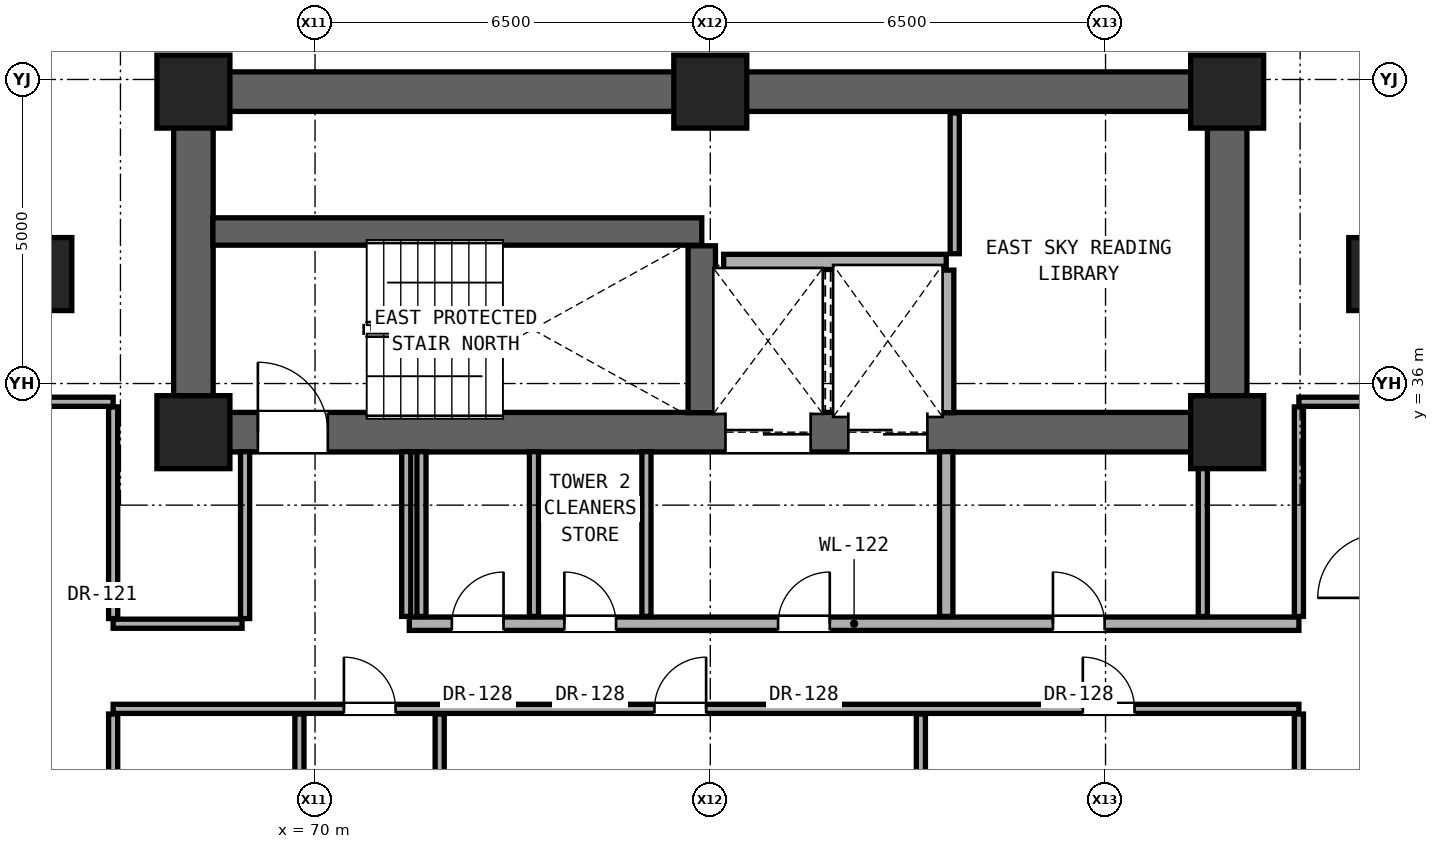
"""IFC4 building model, lengths in metres.
Left out: names, types, materials, properties, quantities, classifications, styles, units other than length and angle.
Written with IfcOpenShell. Run it as: python <this file> out.ifc"""

import sys

from ifc_helpers import new_model, si_unit, direction, frame, frame_2d, origin, origin_2d, place, context, subcontext, project, spatial, rectangle, extrude, element, fill, save


model = new_model("IFC4")
c1 = context("Model", 3, precision=1e-05, world=origin(), true_north=direction((0.0, 1.0)))
c2 = subcontext(c1, "Body", "Model", "MODEL_VIEW")
j1 = project(units=[si_unit("LENGTHUNIT", "METRE"), si_unit("PLANEANGLEUNIT", "RADIAN")], contexts=[c1])
p1 = place(None, origin())
s1 = spatial("IfcSite", under=j1, at=p1, CompositionType="ELEMENT")
p2 = place(p1, origin())
s2 = spatial("IfcBuilding", under=s1, at=p2, CompositionType="ELEMENT")
p3 = place(p2, frame((0.0, 0.0, 104.9)))
s3 = spatial("IfcBuildingStorey", under=s2, at=p3, CompositionType="ELEMENT", Elevation=104.9)
for number, where, z_axis, x_axis in (
    (1, (68.0, 35.2, 0.0), (0.0, 0.0, 1.0), (1.0, 0.0, 0.0)),
    (2, (85.0, 35.2, 0.0), (0.0, 0.0, 1.0), (1.0, 0.0, 0.0)),
    (3, (68.0, 40.8, 0.0), (0.0, 0.0, 1.0), (1.0, 0.0, 0.0)),
    (4, (76.5, 40.8, 0.0), (0.0, 0.0, 1.0), (1.0, 0.0, 0.0)),
    (5, (85.0, 40.8, 0.0), (0.0, 0.0, 1.0), (1.0, 0.0, 0.0)),
):
    element("IfcColumn", number, at=place(p3, frame(where, z_axis=z_axis, x_axis=x_axis)), inside=s3, PredefinedType="COLUMN", context=c2, shape_type="SweptSolid", body=[
        extrude(rectangle(XDim=1.2, YDim=1.2, at=origin_2d()), origin(), (0.0, 0.0, 1.0), 3.3),
    ])
for number, where, z_axis, x_axis in (
    (6, (65.6, 37.8, 0.0), (0.0, 0.0, 1.0), (1.0, 0.0, 0.0)),
    (7, (87.4, 37.8, 0.0), (0.0, 0.0, 1.0), (1.0, 0.0, 0.0)),
):
    element("IfcColumn", number, at=place(p3, frame(where, z_axis=z_axis, x_axis=x_axis)), inside=s3, PredefinedType="PILASTER", context=c2, shape_type="SweptSolid", body=[
        extrude(rectangle(XDim=0.8, YDim=1.2, at=origin_2d()), origin(), (0.0, 0.0, 1.0), 3.3),
    ])
p4 = place(p3, frame((68.0, 40.8, 0.0), z_axis=(0.0, 0.0, 1.0), x_axis=(1.0, 0.0, 0.0)))
e8 = element("IfcWall", 8, at=p4, inside=s3, PredefinedType="SHEAR", context=c2, shape_type="SweptSolid", body=[
    extrude(rectangle(XDim=17.0, YDim=0.65, at=frame_2d((8.5, 0.0))), origin(), (0.0, 0.0, 1.0), 3.08),
])
for number, where, z_axis, x_axis in (
    (9, (68.0, 35.2, 0.0), (0.0, 0.0, 1.0), (0.0, 1.0, 0.0)),
    (10, (85.0, 35.2, 0.0), (0.0, 0.0, 1.0), (0.0, 1.0, 0.0)),
):
    element("IfcWall", number, at=place(p3, frame(where, z_axis=z_axis, x_axis=x_axis)), inside=s3, PredefinedType="SHEAR", context=c2, shape_type="SweptSolid", body=[
        extrude(rectangle(XDim=5.6, YDim=0.65, at=frame_2d((2.8, 0.0))), origin(), (0.0, 0.0, 1.0), 3.08),
    ])
p5 = place(p3, frame((68.0, 35.2, 0.0), z_axis=(0.0, 0.0, 1.0), x_axis=(1.0, 0.0, 0.0)))
e11 = element("IfcWall", 11, at=p5, inside=s3, PredefinedType="SHEAR", context=c2, shape_type="SweptSolid", body=[
    extrude(rectangle(XDim=17.0, YDim=0.65, at=frame_2d((8.5, 0.0))), origin(), (0.0, 0.0, 1.0), 3.08),
])
p6 = place(p5, frame((1.06, 0.0, 0.0)))
e12 = element("IfcOpeningElement", 12, at=p6, cuts=e11, PredefinedType="OPENING", context=c2, shape_type="SweptSolid", body=[
    extrude(rectangle(XDim=1.15, YDim=2.2, at=frame_2d((0.575, 1.1))), frame((0.0, 0.335, 0.0), z_axis=(0.0, -1.0, 0.0), x_axis=(1.0, 0.0, 0.0)), (0.0, 0.0, 1.0), 0.67),
])
p7 = place(p5, frame((8.75, 0.0, 0.0)))
e13 = element("IfcOpeningElement", 13, at=p7, cuts=e11, PredefinedType="OPENING", context=c2, shape_type="SweptSolid", body=[
    extrude(rectangle(XDim=1.4, YDim=2.35, at=frame_2d((0.7, 1.175))), frame((0.0, 0.335, 0.0), z_axis=(0.0, -1.0, 0.0), x_axis=(1.0, 0.0, 0.0)), (0.0, 0.0, 1.0), 0.67),
])
p8 = place(p5, frame((10.77, 0.0, 0.0)))
e14 = element("IfcOpeningElement", 14, at=p8, cuts=e11, PredefinedType="OPENING", context=c2, shape_type="SweptSolid", body=[
    extrude(rectangle(XDim=1.3, YDim=2.3, at=frame_2d((0.65, 1.15))), frame((0.0, 0.335, 0.0), z_axis=(0.0, -1.0, 0.0), x_axis=(1.0, 0.0, 0.0)), (0.0, 0.0, 1.0), 0.67),
])
p9 = place(p3, frame((66.68, 30.65, 0.0), z_axis=(0.0, 0.0, 1.0), x_axis=(1.0, 0.0, 0.0)))
e15 = element("IfcWall", 15, at=p9, inside=s3, PredefinedType="PARTITIONING", context=c2, shape_type="SweptSolid", body=[
    extrude(rectangle(XDim=19.5, YDim=0.15, at=frame_2d((9.75, 0.0))), origin(), (0.0, 0.0, 1.0), 2.145),
])
p10 = place(p9, frame((3.795, 0.0, 0.0)))
e16 = element("IfcOpeningElement", 16, at=p10, cuts=e15, PredefinedType="OPENING", context=c2, shape_type="SweptSolid", body=[
    extrude(rectangle(XDim=0.85, YDim=2.01, at=frame_2d((0.425, 1.005))), frame((0.0, 0.085, 0.0), z_axis=(0.0, -1.0, 0.0), x_axis=(1.0, 0.0, 0.0)), (0.0, 0.0, 1.0), 0.17),
])
p11 = place(p9, frame((8.902, 0.0, 0.0)))
e17 = element("IfcOpeningElement", 17, at=p11, cuts=e15, PredefinedType="OPENING", context=c2, shape_type="SweptSolid", body=[
    extrude(rectangle(XDim=0.85, YDim=2.01, at=frame_2d((0.425, 1.005))), frame((0.0, 0.085, 0.0), z_axis=(0.0, -1.0, 0.0), x_axis=(1.0, 0.0, 0.0)), (0.0, 0.0, 1.0), 0.17),
])
p12 = place(p9, frame((15.947, 0.0, 0.0)))
e18 = element("IfcOpeningElement", 18, at=p12, cuts=e15, PredefinedType="OPENING", context=c2, shape_type="SweptSolid", body=[
    extrude(rectangle(XDim=0.85, YDim=2.01, at=frame_2d((0.425, 1.005))), frame((0.0, 0.085, 0.0), z_axis=(0.0, -1.0, 0.0), x_axis=(1.0, 0.0, 0.0)), (0.0, 0.0, 1.0), 0.17),
])
p13 = place(p3, frame((66.68, 32.05, 0.0), z_axis=(0.0, 0.0, 1.0), x_axis=(1.0, 0.0, 0.0)))
e19 = element("IfcWall", 19, at=p13, inside=s3, PredefinedType="PARTITIONING", context=c2, shape_type="SweptSolid", body=[
    extrude(rectangle(XDim=2.12, YDim=0.15, at=frame_2d((1.06, 0.0))), origin(), (0.0, 0.0, 1.0), 2.145),
])
p14 = place(p3, frame((71.55, 32.05, 0.0), z_axis=(0.0, 0.0, 1.0), x_axis=(1.0, 0.0, 0.0)))
e20 = element("IfcWall", 20, at=p14, inside=s3, PredefinedType="SOLIDWALL", context=c2, shape_type="SweptSolid", body=[
    extrude(rectangle(XDim=14.63, YDim=0.22, at=frame_2d((7.315, 0.0))), origin(), (0.0, 0.0, 1.0), 2.145),
])
p15 = place(p14, frame((6.065, 0.0, 0.0)))
e21 = element("IfcOpeningElement", 21, at=p15, cuts=e20, PredefinedType="OPENING", context=c2, shape_type="SweptSolid", body=[
    extrude(rectangle(XDim=0.85, YDim=2.01, at=frame_2d((0.425, 1.005))), frame((0.0, 0.12, 0.0), z_axis=(0.0, -1.0, 0.0), x_axis=(1.0, 0.0, 0.0)), (0.0, 0.0, 1.0), 0.24),
])
p16 = place(p14, frame((10.585, 0.0, 0.0)))
e22 = element("IfcOpeningElement", 22, at=p16, cuts=e20, PredefinedType="OPENING", context=c2, shape_type="SweptSolid", body=[
    extrude(rectangle(XDim=0.85, YDim=2.01, at=frame_2d((0.425, 1.005))), frame((0.0, 0.12, 0.0), z_axis=(0.0, -1.0, 0.0), x_axis=(1.0, 0.0, 0.0)), (0.0, 0.0, 1.0), 0.24),
])
p17 = place(p14, frame((0.7, 0.0, 0.0)))
e23 = element("IfcOpeningElement", 23, at=p17, cuts=e20, PredefinedType="OPENING", context=c2, shape_type="SweptSolid", body=[
    extrude(rectangle(XDim=0.85, YDim=2.01, at=frame_2d((0.425, 1.005))), frame((0.0, 0.12, 0.0), z_axis=(0.0, -1.0, 0.0), x_axis=(1.0, 0.0, 0.0)), (0.0, 0.0, 1.0), 0.24),
])
p18 = place(p14, frame((2.55, 0.0, 0.0)))
e24 = element("IfcOpeningElement", 24, at=p18, cuts=e20, PredefinedType="OPENING", context=c2, shape_type="SweptSolid", body=[
    extrude(rectangle(XDim=0.85, YDim=2.01, at=frame_2d((0.425, 1.005))), frame((0.0, 0.12, 0.0), z_axis=(0.0, -1.0, 0.0), x_axis=(1.0, 0.0, 0.0)), (0.0, 0.0, 1.0), 0.24),
])
p19 = place(p3, frame((65.32, 35.7, 0.0), z_axis=(0.0, 0.0, 1.0), x_axis=(1.0, 0.0, 0.0)))
e25 = element("IfcWall", 25, at=p19, inside=s3, PredefinedType="PARTITIONING", context=c2, shape_type="SweptSolid", body=[
    extrude(rectangle(XDim=1.36, YDim=0.15, at=frame_2d((0.68, 0.0))), origin(), (0.0, 0.0, 1.0), 3.08),
])
p20 = place(p3, frame((86.18, 35.7, 0.0), z_axis=(0.0, 0.0, 1.0), x_axis=(1.0, 0.0, 0.0)))
e26 = element("IfcWall", 26, at=p20, inside=s3, PredefinedType="PARTITIONING", context=c2, shape_type="SweptSolid", body=[
    extrude(rectangle(XDim=1.36, YDim=0.15, at=frame_2d((0.68, 0.0))), origin(), (0.0, 0.0, 1.0), 3.08),
])
p21 = place(p3, frame((76.72, 38.0, 0.0), z_axis=(0.0, 0.0, 1.0), x_axis=(1.0, 0.0, 0.0)))
e27 = element("IfcWall", 27, at=p21, inside=s3, PredefinedType="SOLIDWALL", context=c2, shape_type="SweptSolid", body=[
    extrude(rectangle(XDim=3.66, YDim=0.25, at=frame_2d((1.83, 0.0))), origin(), (0.0, 0.0, 1.0), 3.08),
])
p22 = place(p3, frame((68.32, 38.5, 0.0), z_axis=(0.0, 0.0, 1.0), x_axis=(1.0, 0.0, 0.0)))
e28 = element("IfcWall", 28, at=p22, inside=s3, PredefinedType="SHEAR", context=c2, shape_type="SweptSolid", body=[
    extrude(rectangle(XDim=8.04, YDim=0.45, at=frame_2d((4.02, 0.0))), origin(), (0.0, 0.0, 1.0), 3.08),
])
p23 = place(p3, frame((66.68, 24.935, 0.0), z_axis=(0.0, 0.0, 1.0), x_axis=(0.0, 1.0, 0.0)))
e29 = element("IfcWall", 29, at=p23, inside=s3, PredefinedType="PARTITIONING", context=c2, shape_type="SweptSolid", body=[
    extrude(rectangle(XDim=5.63, YDim=0.15, at=frame_2d((2.815, 0.0))), origin(), (0.0, 0.0, 1.0), 2.299),
])
p24 = place(p23, frame((2.34, 0.0, 0.0)))
e30 = element("IfcOpeningElement", 30, at=p24, cuts=e29, PredefinedType="OPENING", context=c2, shape_type="SweptSolid", body=[
    extrude(rectangle(XDim=0.95, YDim=2.15, at=frame_2d((0.475, 1.075))), frame((0.0, 0.085, 0.0), z_axis=(0.0, -1.0, 0.0), x_axis=(1.0, 0.0, 0.0)), (0.0, 0.0, 1.0), 0.17),
])
p25 = place(p3, frame((66.68, 32.135, 0.0), z_axis=(0.0, 0.0, 1.0), x_axis=(0.0, 1.0, 0.0)))
e31 = element("IfcWall", 31, at=p25, inside=s3, PredefinedType="PARTITIONING", context=c2, shape_type="SweptSolid", body=[
    extrude(rectangle(XDim=3.48, YDim=0.15, at=frame_2d((1.74, 0.0))), origin(), (0.0, 0.0, 1.0), 2.472),
])
p26 = place(p3, frame((68.85, 32.135, 0.0), z_axis=(0.0, 0.0, 1.0), x_axis=(0.0, 1.0, 0.0)))
e32 = element("IfcWall", 32, at=p26, inside=s3, PredefinedType="PARTITIONING", context=c2, shape_type="SweptSolid", body=[
    extrude(rectangle(XDim=2.745, YDim=0.15, at=frame_2d((1.373, 0.0))), origin(), (0.0, 0.0, 1.0), 3.08),
])
p27 = place(p3, frame((69.743, 24.935, 0.0), z_axis=(0.0, 0.0, 1.0), x_axis=(0.0, 1.0, 0.0)))
e33 = element("IfcWall", 33, at=p27, inside=s3, PredefinedType="PARTITIONING", context=c2, shape_type="SweptSolid", body=[
    extrude(rectangle(XDim=5.63, YDim=0.15, at=frame_2d((2.815, 0.0))), origin(), (0.0, 0.0, 1.0), 2.145),
])
for number, where, z_axis, x_axis in (
    (34, (71.5, 32.17, 0.0), (0.0, 0.0, 1.0), (0.0, 1.0, 0.0)),
    (35, (71.75, 32.17, 0.0), (0.0, 0.0, 1.0), (0.0, 1.0, 0.0)),
):
    element("IfcWall", number, at=place(p3, frame(where, z_axis=z_axis, x_axis=x_axis)), inside=s3, PredefinedType="PARTITIONING", context=c2, shape_type="SweptSolid", body=[
        extrude(rectangle(XDim=2.71, YDim=0.15, at=frame_2d((1.355, 0.0))), origin(), (0.0, 0.0, 1.0), 3.08),
    ])
p28 = place(p3, frame((72.05, 26.17, 0.0), z_axis=(0.0, 0.0, 1.0), x_axis=(0.0, 1.0, 0.0)))
e36 = element("IfcWall", 36, at=p28, inside=s3, PredefinedType="PARTITIONING", context=c2, shape_type="SweptSolid", body=[
    extrude(rectangle(XDim=4.395, YDim=0.15, at=frame_2d((2.198, 0.0))), origin(), (0.0, 0.0, 1.0), 2.145),
])
for number, where, z_axis, x_axis in (
    (37, (73.6, 32.17, 0.0), (0.0, 0.0, 1.0), (0.0, 1.0, 0.0)),
    (38, (75.45, 32.17, 0.0), (0.0, 0.0, 1.0), (0.0, 1.0, 0.0)),
):
    element("IfcWall", number, at=place(p3, frame(where, z_axis=z_axis, x_axis=x_axis)), inside=s3, PredefinedType="PARTITIONING", context=c2, shape_type="SweptSolid", body=[
        extrude(rectangle(XDim=2.71, YDim=0.15, at=frame_2d((1.355, 0.0))), origin(), (0.0, 0.0, 1.0), 3.08),
    ])
p29 = place(p3, frame((76.36, 35.52, 0.0), z_axis=(0.0, 0.0, 1.0), x_axis=(0.0, 1.0, 0.0)))
e39 = element("IfcWall", 39, at=p29, inside=s3, PredefinedType="SHEAR", context=c2, shape_type="SweptSolid", body=[
    extrude(rectangle(XDim=2.745, YDim=0.45, at=frame_2d((1.373, 0.0))), origin(), (0.0, 0.0, 1.0), 3.08),
])
p30 = place(p3, frame((79.963, 26.17, 0.0), z_axis=(0.0, 0.0, 1.0), x_axis=(0.0, 1.0, 0.0)))
e40 = element("IfcWall", 40, at=p30, inside=s3, PredefinedType="PARTITIONING", context=c2, shape_type="SweptSolid", body=[
    extrude(rectangle(XDim=4.395, YDim=0.15, at=frame_2d((2.198, 0.0))), origin(), (0.0, 0.0, 1.0), 2.145),
])
p31 = place(p3, frame((80.38, 32.17, 0.0), z_axis=(0.0, 0.0, 1.0), x_axis=(0.0, 1.0, 0.0)))
e41 = element("IfcWall", 41, at=p31, inside=s3, PredefinedType="SOLIDWALL", context=c2, shape_type="SweptSolid", body=[
    extrude(rectangle(XDim=2.71, YDim=0.22, at=frame_2d((1.355, 0.0))), origin(), (0.0, 0.0, 1.0), 3.08),
])
p32 = place(p3, frame((80.38, 35.52, 0.0), z_axis=(0.0, 0.0, 1.0), x_axis=(0.0, 1.0, 0.0)))
e42 = element("IfcWall", 42, at=p32, inside=s3, PredefinedType="SOLIDWALL", context=c2, shape_type="SweptSolid", body=[
    extrude(rectangle(XDim=2.345, YDim=0.25, at=frame_2d((1.172, 0.0))), origin(), (0.0, 0.0, 1.0), 3.08),
])
p33 = place(p3, frame((80.52, 38.135, 0.0), z_axis=(0.0, 0.0, 1.0), x_axis=(0.0, 1.0, 0.0)))
e43 = element("IfcWall", 43, at=p33, inside=s3, PredefinedType="PARTITIONING", context=c2, shape_type="SweptSolid", body=[
    extrude(rectangle(XDim=2.315, YDim=0.15, at=frame_2d((1.157, 0.0))), origin(), (0.0, 0.0, 1.0), 3.08),
])
p34 = place(p3, frame((84.6, 32.17, 0.0), z_axis=(0.0, 0.0, 1.0), x_axis=(0.0, 1.0, 0.0)))
e44 = element("IfcWall", 44, at=p34, inside=s3, PredefinedType="PARTITIONING", context=c2, shape_type="SweptSolid", body=[
    extrude(rectangle(XDim=2.71, YDim=0.15, at=frame_2d((1.355, 0.0))), origin(), (0.0, 0.0, 1.0), 3.08),
])
p35 = place(p3, frame((86.18, 26.17, 0.0), z_axis=(0.0, 0.0, 1.0), x_axis=(0.0, 1.0, 0.0)))
e45 = element("IfcWall", 45, at=p35, inside=s3, PredefinedType="PARTITIONING", context=c2, shape_type="SweptSolid", body=[
    extrude(rectangle(XDim=4.395, YDim=0.15, at=frame_2d((2.198, 0.0))), origin(), (0.0, 0.0, 1.0), 2.299),
])
p36 = place(p3, frame((86.18, 32.17, 0.0), z_axis=(0.0, 0.0, 1.0), x_axis=(0.0, 1.0, 0.0)))
e46 = element("IfcWall", 46, at=p36, inside=s3, PredefinedType="PARTITIONING", context=c2, shape_type="SweptSolid", body=[
    extrude(rectangle(XDim=3.445, YDim=0.15, at=frame_2d((1.723, 0.0))), origin(), (0.0, 0.0, 1.0), 2.472),
])
p37 = place(p6, origin())
e47 = element("IfcDoor", 47, at=p37, inside=s3, OperationType="SINGLE_SWING_LEFT", PredefinedType="DOOR", context=c2, shape_type="SweptSolid", body=[
    extrude(rectangle(XDim=1.15, YDim=2.2, at=frame_2d((0.575, 1.1))), frame((0.0, 0.025, 0.0), z_axis=(0.0, -1.0, 0.0), x_axis=(1.0, 0.0, 0.0)), (0.0, 0.0, 1.0), 0.05),
])
fill(e12, e47)
p38 = place(p15, origin())
e48 = element("IfcDoor", 48, at=p38, inside=s3, OperationType="SINGLE_SWING_RIGHT", PredefinedType="DOOR", context=c2, shape_type="SweptSolid", body=[
    extrude(rectangle(XDim=0.85, YDim=2.01, at=frame_2d((0.425, 1.005))), frame((0.0, 0.025, 0.0), z_axis=(0.0, -1.0, 0.0), x_axis=(1.0, 0.0, 0.0)), (0.0, 0.0, 1.0), 0.05),
])
fill(e21, e48)
p39 = place(p16, origin())
e49 = element("IfcDoor", 49, at=p39, inside=s3, OperationType="SINGLE_SWING_LEFT", PredefinedType="DOOR", context=c2, shape_type="SweptSolid", body=[
    extrude(rectangle(XDim=0.85, YDim=2.01, at=frame_2d((0.425, 1.005))), frame((0.0, 0.025, 0.0), z_axis=(0.0, -1.0, 0.0), x_axis=(1.0, 0.0, 0.0)), (0.0, 0.0, 1.0), 0.05),
])
fill(e22, e49)
p40 = place(p17, origin())
e50 = element("IfcDoor", 50, at=p40, inside=s3, OperationType="SINGLE_SWING_RIGHT", PredefinedType="DOOR", context=c2, shape_type="SweptSolid", body=[
    extrude(rectangle(XDim=0.85, YDim=2.01, at=frame_2d((0.425, 1.005))), frame((0.0, 0.025, 0.0), z_axis=(0.0, -1.0, 0.0), x_axis=(1.0, 0.0, 0.0)), (0.0, 0.0, 1.0), 0.05),
])
fill(e23, e50)
p41 = place(p18, origin())
e51 = element("IfcDoor", 51, at=p41, inside=s3, OperationType="SINGLE_SWING_LEFT", PredefinedType="DOOR", context=c2, shape_type="SweptSolid", body=[
    extrude(rectangle(XDim=0.85, YDim=2.01, at=frame_2d((0.425, 1.005))), frame((0.0, 0.025, 0.0), z_axis=(0.0, -1.0, 0.0), x_axis=(1.0, 0.0, 0.0)), (0.0, 0.0, 1.0), 0.05),
])
fill(e24, e51)
p42 = place(p10, origin())
e52 = element("IfcDoor", 52, at=p42, inside=s3, OperationType="SINGLE_SWING_LEFT", PredefinedType="DOOR", context=c2, shape_type="SweptSolid", body=[
    extrude(rectangle(XDim=0.85, YDim=2.01, at=frame_2d((0.425, 1.005))), frame((0.0, 0.025, 0.0), z_axis=(0.0, -1.0, 0.0), x_axis=(1.0, 0.0, 0.0)), (0.0, 0.0, 1.0), 0.05),
])
fill(e16, e52)
p43 = place(p11, origin())
e53 = element("IfcDoor", 53, at=p43, inside=s3, OperationType="SINGLE_SWING_RIGHT", PredefinedType="DOOR", context=c2, shape_type="SweptSolid", body=[
    extrude(rectangle(XDim=0.85, YDim=2.01, at=frame_2d((0.425, 1.005))), frame((0.0, 0.025, 0.0), z_axis=(0.0, -1.0, 0.0), x_axis=(1.0, 0.0, 0.0)), (0.0, 0.0, 1.0), 0.05),
])
fill(e17, e53)
p44 = place(p12, origin())
e54 = element("IfcDoor", 54, at=p44, inside=s3, OperationType="SINGLE_SWING_LEFT", PredefinedType="DOOR", context=c2, shape_type="SweptSolid", body=[
    extrude(rectangle(XDim=0.85, YDim=2.01, at=frame_2d((0.425, 1.005))), frame((0.0, 0.025, 0.0), z_axis=(0.0, -1.0, 0.0), x_axis=(1.0, 0.0, 0.0)), (0.0, 0.0, 1.0), 0.05),
])
fill(e18, e54)
p45 = place(p7, origin())
e55 = element("IfcDoor", 55, at=p45, inside=s3, OperationType="DOUBLE_DOOR_SLIDING", PredefinedType="DOOR", context=c2, shape_type="SweptSolid", body=[
    extrude(rectangle(XDim=1.4, YDim=2.35, at=frame_2d((0.7, 1.175))), frame((0.0, 0.025, 0.0), z_axis=(0.0, -1.0, 0.0), x_axis=(1.0, 0.0, 0.0)), (0.0, 0.0, 1.0), 0.05),
])
fill(e13, e55)
p46 = place(p8, origin())
e56 = element("IfcDoor", 56, at=p46, inside=s3, OperationType="DOUBLE_DOOR_SLIDING", PredefinedType="DOOR", context=c2, shape_type="SweptSolid", body=[
    extrude(rectangle(XDim=1.3, YDim=2.3, at=frame_2d((0.65, 1.15))), frame((0.0, 0.025, 0.0), z_axis=(0.0, -1.0, 0.0), x_axis=(1.0, 0.0, 0.0)), (0.0, 0.0, 1.0), 0.05),
])
fill(e14, e56)
save(model, sys.argv[1])
